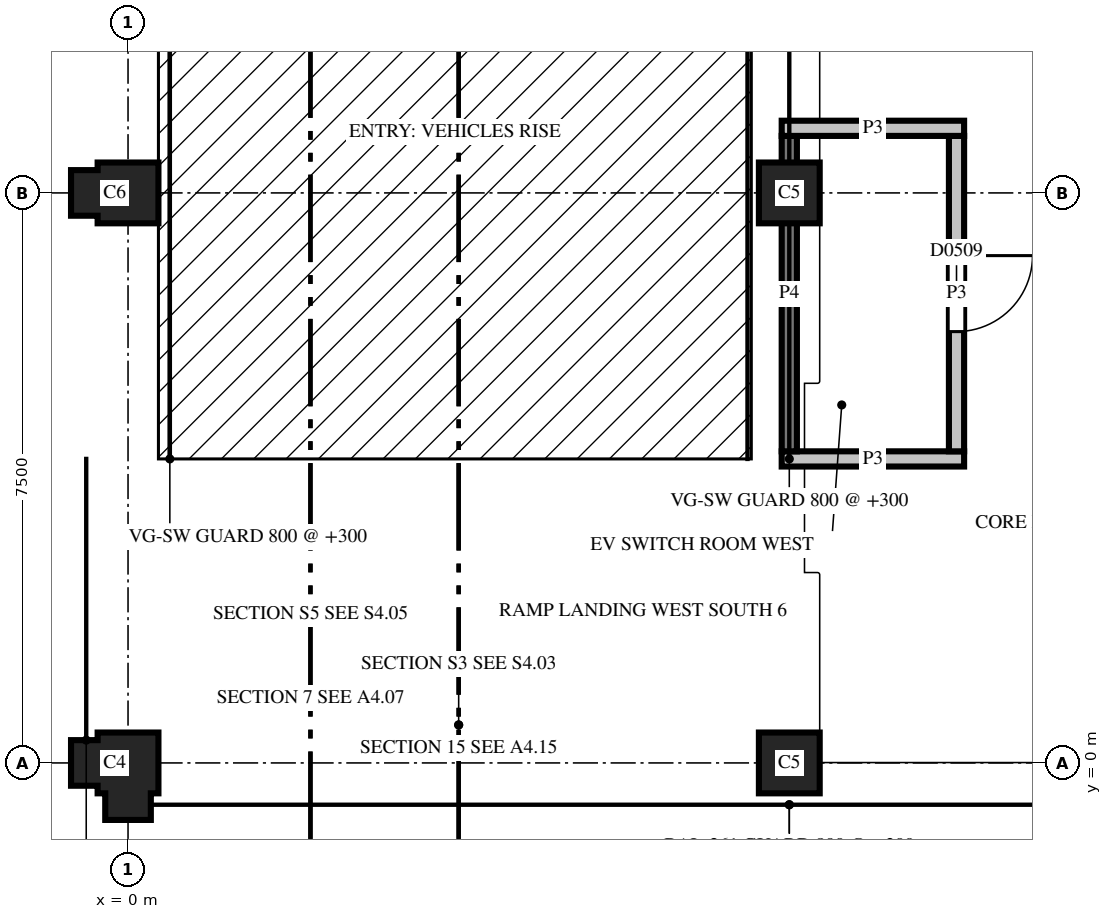
"""IFC4 building model, lengths in metres.
Left out: names, types, materials, properties, quantities, classifications, styles, units other than length and angle.
Written with IfcOpenShell. Run it as: python <this file> out.ifc"""

import sys

from ifc_helpers import new_model, si_unit, direction, frame, frame_2d, origin, place, context, subcontext, project, spatial, polyline, rectangle, outline, extrude, element, fill, save


model = new_model("IFC4")
c1 = context("Model", 3, precision=1e-05, world=origin(), true_north=direction((0.0, 1.0)))
c2 = subcontext(c1, "Body", "Model", "MODEL_VIEW")
j1 = project(units=[si_unit("LENGTHUNIT", "METRE"), si_unit("PLANEANGLEUNIT", "RADIAN")], contexts=[c1])
p1 = place(None, origin())
s1 = spatial("IfcSite", under=j1, at=p1, CompositionType="ELEMENT")
p2 = place(p1, origin())
s2 = spatial("IfcBuilding", under=s1, at=p2, CompositionType="ELEMENT")
p3 = place(p2, frame((0.0, 0.0, 19.3)))
s3 = spatial("IfcBuildingStorey", under=s2, at=p3, CompositionType="ELEMENT", Elevation=19.3)
p4 = place(p3, frame((0.0, 0.0, 0.0), z_axis=(0.0, 0.0, 1.0), x_axis=(-1.0, 0.0, 0.0)))
e1 = element("IfcColumn", 1, at=p4, inside=s3, PredefinedType="COLUMN", context=c2, shape_type="SweptSolid", body=[
    extrude(outline(polyline([(-0.4, -0.4), (0.4, -0.4), (0.4, -0.3), (0.75, -0.3), (0.75, 0.3), (0.4, 0.3), (0.4, 0.4), (0.3, 0.4), (0.3, 0.75), (-0.3, 0.75), (-0.3, 0.4), (-0.4, 0.4), (-0.4, -0.4)])), origin(), (0.0, 0.0, 1.0), 3.7),
])
p5 = place(p3, frame((8.7, 0.0, 0.0), z_axis=(0.0, 0.0, 1.0), x_axis=(1.0, 0.0, 0.0)))
e2 = element("IfcColumn", 2, at=p5, inside=s3, PredefinedType="COLUMN", context=c2, shape_type="SweptSolid", body=[
    extrude(outline(polyline([(-0.4, -0.4), (0.4, -0.4), (0.4, 0.4), (-0.4, 0.4), (-0.4, -0.4)])), origin(), (0.0, 0.0, 1.0), 3.7),
])
p6 = place(p3, frame((0.0, 7.5, 0.0), z_axis=(0.0, 0.0, 1.0), x_axis=(-1.0, 0.0, 0.0)))
e3 = element("IfcColumn", 3, at=p6, inside=s3, PredefinedType="COLUMN", context=c2, shape_type="SweptSolid", body=[
    extrude(outline(polyline([(-0.4, -0.4), (0.4, -0.4), (0.4, -0.3), (0.75, -0.3), (0.75, 0.3), (0.4, 0.3), (0.4, 0.4), (-0.4, 0.4), (-0.4, -0.4)])), origin(), (0.0, 0.0, 1.0), 3.7),
])
p7 = place(p3, frame((8.7, 7.5, 0.0), z_axis=(0.0, 0.0, 1.0), x_axis=(1.0, 0.0, 0.0)))
e4 = element("IfcColumn", 4, at=p7, inside=s3, PredefinedType="COLUMN", context=c2, shape_type="SweptSolid", body=[
    extrude(outline(polyline([(-0.4, -0.4), (0.4, -0.4), (0.4, 0.4), (-0.4, 0.4), (-0.4, -0.4)])), origin(), (0.0, 0.0, 1.0), 3.7),
])
p8 = place(p3, frame((8.6, 4.0, 0.0), z_axis=(0.0, 0.0, 1.0), x_axis=(1.0, 0.0, 0.0)))
e5 = element("IfcWall", 5, at=p8, inside=s3, PredefinedType="PARTITIONING", context=c2, shape_type="SweptSolid", body=[
    extrude(rectangle(XDim=2.4, YDim=0.2, at=frame_2d((1.2, 0.0))), origin(), (0.0, 0.0, 1.0), 2.88),
])
p9 = place(p3, frame((10.9, 4.1, 0.0), z_axis=(0.0, 0.0, 1.0), x_axis=(0.0, 1.0, 0.0)))
e6 = element("IfcWall", 6, at=p9, inside=s3, PredefinedType="PARTITIONING", context=c2, shape_type="SweptSolid", body=[
    extrude(rectangle(XDim=4.15, YDim=0.2, at=frame_2d((2.075, 0.0))), origin(), (0.0, 0.0, 1.0), 2.88),
])
p10 = place(p9, frame((1.575, 0.0, 0.0)))
e7 = element("IfcOpeningElement", 7, at=p10, cuts=e6, PredefinedType="OPENING", context=c2, shape_type="SweptSolid", body=[
    extrude(rectangle(XDim=1.0, YDim=2.1, at=frame_2d((0.5, 1.05))), frame((0.0, 0.11, 0.0), z_axis=(0.0, -1.0, 0.0), x_axis=(1.0, 0.0, 0.0)), (0.0, 0.0, 1.0), 0.22),
])
p11 = place(p3, frame((8.7, 8.25, 0.0), z_axis=(0.0, 0.0, 1.0), x_axis=(0.0, -1.0, 0.0)))
e8 = element("IfcWall", 8, at=p11, inside=s3, PredefinedType="PARTITIONING", context=c2, shape_type="SweptSolid", body=[
    extrude(rectangle(XDim=4.15, YDim=0.2, at=frame_2d((2.075, 0.0))), origin(), (0.0, 0.0, 1.0), 2.6),
])
p12 = place(p3, frame((11.0, 8.35, 0.0), z_axis=(0.0, 0.0, 1.0), x_axis=(-1.0, 0.0, 0.0)))
e9 = element("IfcWall", 9, at=p12, inside=s3, PredefinedType="PARTITIONING", context=c2, shape_type="SweptSolid", body=[
    extrude(rectangle(XDim=2.4, YDim=0.2, at=frame_2d((1.2, 0.0))), origin(), (0.0, 0.0, 1.0), 2.88),
])
p13 = place(p10, origin())
e10 = element("IfcDoor", 10, at=p13, inside=s3, OperationType="SINGLE_SWING_RIGHT", PredefinedType="DOOR", context=c2, shape_type="SweptSolid", body=[
    extrude(rectangle(XDim=1.0, YDim=2.1, at=frame_2d((0.5, 1.05))), frame((0.0, 0.025, 0.0), z_axis=(0.0, -1.0, 0.0), x_axis=(1.0, 0.0, 0.0)), (0.0, 0.0, 1.0), 0.05),
])
fill(e7, e10)
save(model, sys.argv[1])
